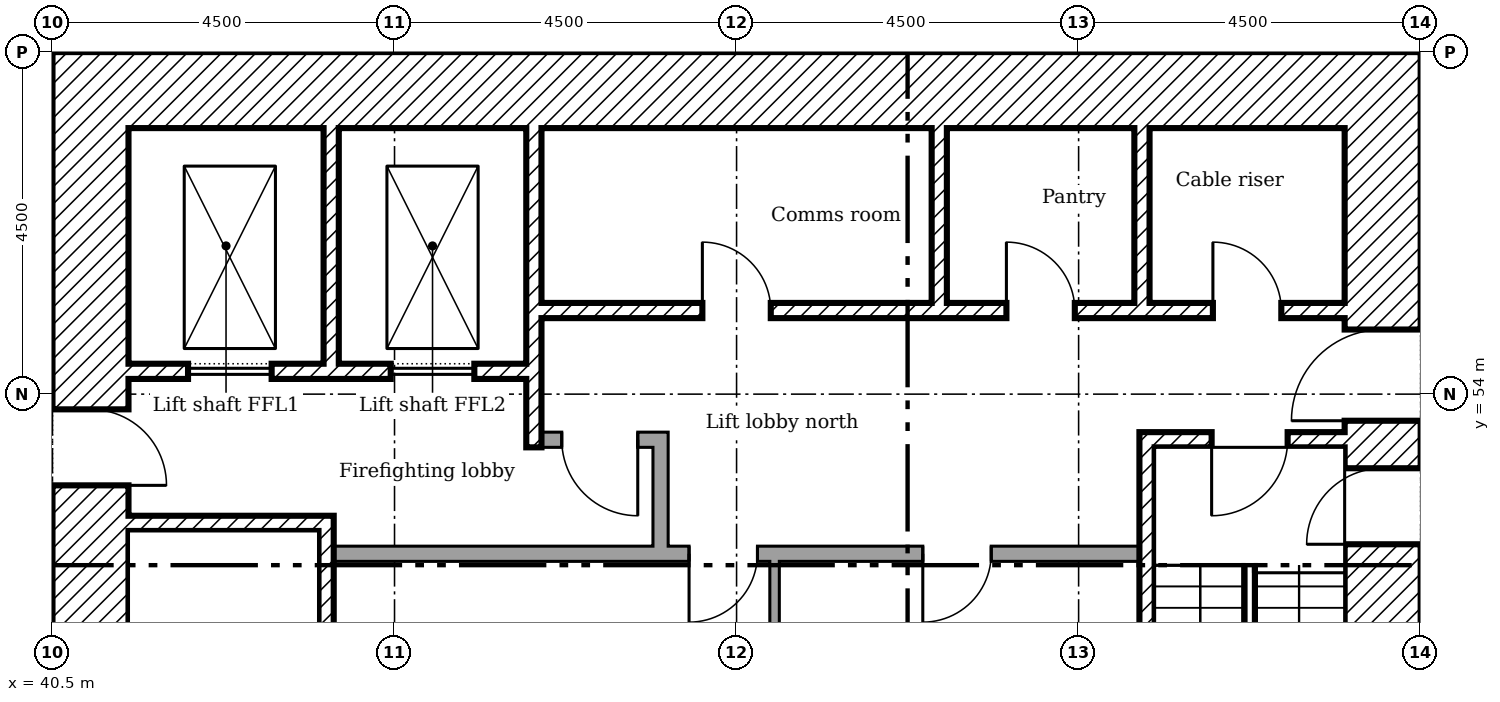
"""IFC4 building model, lengths in metres.
Left out: names, types, materials, properties, quantities, classifications, styles, units other than length and angle.
Written with IfcOpenShell. Run it as: python <this file> out.ifc"""

import sys

from ifc_helpers import new_model, si_unit, direction, frame, frame_2d, origin, place, context, subcontext, project, spatial, rectangle, extrude, element, fill, save


model = new_model("IFC4")
c1 = context("Model", 3, precision=1e-05, world=origin(), true_north=direction((0.0, 1.0)))
c2 = subcontext(c1, "Body", "Model", "MODEL_VIEW")
j1 = project(units=[si_unit("LENGTHUNIT", "METRE"), si_unit("PLANEANGLEUNIT", "RADIAN")], contexts=[c1])
p1 = place(None, origin())
s1 = spatial("IfcSite", under=j1, at=p1, CompositionType="ELEMENT")
p2 = place(p1, origin())
s2 = spatial("IfcBuilding", under=s1, at=p2, CompositionType="ELEMENT")
p3 = place(p2, frame((0.0, 0.0, 6.0)))
s3 = spatial("IfcBuildingStorey", under=s2, at=p3, CompositionType="ELEMENT", Elevation=6.0)
p4 = place(p3, frame((58.0, 40.5, 0.0), z_axis=(0.0, 0.0, 1.0), x_axis=(0.0, 1.0, 0.0)))
e1 = element("IfcWall", 1, at=p4, inside=s3, PredefinedType="SHEAR", context=c2, shape_type="SweptSolid", body=[
    extrude(rectangle(XDim=18.0, YDim=1.0, at=frame_2d((9.0, 0.0))), origin(), (0.0, 0.0, 1.0), 5.0),
])
p5 = place(p4, frame((13.15, 0.0, 0.0)))
e2 = element("IfcOpeningElement", 2, at=p5, cuts=e1, PredefinedType="OPENING", context=c2, shape_type="SweptSolid", body=[
    extrude(rectangle(XDim=1.2, YDim=2.1, at=frame_2d((0.6, 1.05))), frame((0.0, 0.51, 0.0), z_axis=(0.0, -1.0, 0.0), x_axis=(1.0, 0.0, 0.0)), (0.0, 0.0, 1.0), 1.02),
])
p6 = place(p4, frame((3.9, 0.0, 0.0)))
e3 = element("IfcOpeningElement", 3, at=p6, cuts=e1, PredefinedType="OPENING", context=c2, shape_type="SweptSolid", body=[
    extrude(rectangle(XDim=1.8, YDim=2.1, at=frame_2d((0.9, 1.05))), frame((0.0, 0.51, 0.0), z_axis=(0.0, -1.0, 0.0), x_axis=(1.0, 0.0, 0.0)), (0.0, 0.0, 1.0), 1.02),
])
p7 = place(p4, frame((11.525, 0.0, 0.0)))
e4 = element("IfcOpeningElement", 4, at=p7, cuts=e1, PredefinedType="OPENING", context=c2, shape_type="SweptSolid", body=[
    extrude(rectangle(XDim=1.0, YDim=2.1, at=frame_2d((0.5, 1.05))), frame((0.0, 0.51, 0.0), z_axis=(0.0, -1.0, 0.0), x_axis=(1.0, 0.0, 0.0)), (0.0, 0.0, 1.0), 1.02),
])
p8 = place(p3, frame((41.5, 58.0, 0.0)))
e5 = element("IfcWall", 5, at=p8, inside=s3, PredefinedType="SHEAR", context=c2, shape_type="SweptSolid", body=[
    extrude(rectangle(XDim=16.0, YDim=1.0, at=frame_2d((8.0, 0.0))), origin(), (0.0, 0.0, 1.0), 5.0),
])
p9 = place(p3, frame((41.0, 40.5, 0.0), z_axis=(0.0, 0.0, 1.0), x_axis=(0.0, 1.0, 0.0)))
e6 = element("IfcWall", 6, at=p9, inside=s3, PredefinedType="SHEAR", context=c2, shape_type="SweptSolid", body=[
    extrude(rectangle(XDim=18.0, YDim=1.0, at=frame_2d((9.0, 0.0))), origin(), (0.0, 0.0, 1.0), 5.0),
])
p10 = place(p9, frame((3.65, 0.0, 0.0)))
e7 = element("IfcOpeningElement", 7, at=p10, cuts=e6, PredefinedType="OPENING", context=c2, shape_type="SweptSolid", body=[
    extrude(rectangle(XDim=1.2, YDim=2.1, at=frame_2d((0.6, 1.05))), frame((0.0, 0.51, 0.0), z_axis=(0.0, -1.0, 0.0), x_axis=(1.0, 0.0, 0.0)), (0.0, 0.0, 1.0), 1.02),
])
p11 = place(p9, frame((5.475, 0.0, 0.0)))
e8 = element("IfcOpeningElement", 8, at=p11, cuts=e6, PredefinedType="OPENING", context=c2, shape_type="SweptSolid", body=[
    extrude(rectangle(XDim=1.0, YDim=2.1, at=frame_2d((0.5, 1.05))), frame((0.0, 0.51, 0.0), z_axis=(0.0, -1.0, 0.0), x_axis=(1.0, 0.0, 0.0)), (0.0, 0.0, 1.0), 1.02),
])
p12 = place(p9, frame((12.3, 0.0, 0.0)))
e9 = element("IfcOpeningElement", 9, at=p12, cuts=e6, PredefinedType="OPENING", context=c2, shape_type="SweptSolid", body=[
    extrude(rectangle(XDim=1.0, YDim=2.1, at=frame_2d((0.5, 1.05))), frame((0.0, 0.51, 0.0), z_axis=(0.0, -1.0, 0.0), x_axis=(1.0, 0.0, 0.0)), (0.0, 0.0, 1.0), 1.02),
])
p13 = place(p3, frame((44.167, 57.5, 0.0), z_axis=(0.0, 0.0, 1.0), x_axis=(0.0, -1.0, 0.0)))
e10 = element("IfcWall", 10, at=p13, inside=s3, PredefinedType="SHEAR", context=c2, shape_type="SweptSolid", body=[
    extrude(rectangle(XDim=3.1, YDim=0.2, at=frame_2d((1.55, 0.0))), origin(), (0.0, 0.0, 1.0), 5.0),
])
p14 = place(p3, frame((46.833, 57.5, 0.0), z_axis=(0.0, 0.0, 1.0), x_axis=(0.0, -1.0, 0.0)))
e11 = element("IfcWall", 11, at=p14, inside=s3, PredefinedType="SHEAR", context=c2, shape_type="SweptSolid", body=[
    extrude(rectangle(XDim=4.2, YDim=0.2, at=frame_2d((2.1, 0.0))), origin(), (0.0, 0.0, 1.0), 5.0),
])
for number, where, z_axis, x_axis in (
    (12, (52.167, 57.5, 0.0), (0.0, 0.0, 1.0), (0.0, -1.0, 0.0)),
    (13, (54.833, 57.5, 0.0), (0.0, 0.0, 1.0), (0.0, -1.0, 0.0)),
):
    element("IfcWall", number, at=place(p3, frame(where, z_axis=z_axis, x_axis=x_axis)), inside=s3, PredefinedType="SHEAR", context=c2, shape_type="SweptSolid", body=[
        extrude(rectangle(XDim=2.3, YDim=0.2, at=frame_2d((1.15, 0.0))), origin(), (0.0, 0.0, 1.0), 5.0),
    ])
p15 = place(p3, frame((48.5, 51.9, 0.0), z_axis=(0.0, 0.0, 1.0), x_axis=(0.0, 1.0, 0.0)))
e14 = element("IfcWall", 14, at=p15, inside=s3, PredefinedType="PARTITIONING", context=c2, shape_type="SweptSolid", body=[
    extrude(rectangle(XDim=1.6, YDim=0.2, at=frame_2d((0.8, 0.0))), origin(), (0.0, 0.0, 1.0), 5.0),
])
p16 = place(p3, frame((46.933, 53.4, 0.0)))
e15 = element("IfcWall", 15, at=p16, inside=s3, PredefinedType="PARTITIONING", context=c2, shape_type="SweptSolid", body=[
    extrude(rectangle(XDim=1.467, YDim=0.2, at=frame_2d((0.733, 0.0))), origin(), (0.0, 0.0, 1.0), 5.0),
])
p17 = place(p16, frame((0.267, 0.0, 0.0)))
e16 = element("IfcOpeningElement", 16, at=p17, cuts=e15, PredefinedType="OPENING", context=c2, shape_type="SweptSolid", body=[
    extrude(rectangle(XDim=1.0, YDim=2.1, at=frame_2d((0.5, 1.05))), frame((0.0, 0.11, 0.0), z_axis=(0.0, -1.0, 0.0), x_axis=(1.0, 0.0, 0.0)), (0.0, 0.0, 1.0), 0.22),
])
p18 = place(p3, frame((46.933, 55.1, 0.0)))
e17 = element("IfcWall", 17, at=p18, inside=s3, PredefinedType="SHEAR", context=c2, shape_type="SweptSolid", body=[
    extrude(rectangle(XDim=10.567, YDim=0.2, at=frame_2d((5.283, 0.0))), origin(), (0.0, 0.0, 1.0), 5.0),
])
p19 = place(p18, frame((8.833, 0.0, 0.0)))
e18 = element("IfcOpeningElement", 18, at=p19, cuts=e17, PredefinedType="OPENING", context=c2, shape_type="SweptSolid", body=[
    extrude(rectangle(XDim=0.9, YDim=2.1, at=frame_2d((0.45, 1.05))), frame((0.0, 0.11, 0.0), z_axis=(0.0, -1.0, 0.0), x_axis=(1.0, 0.0, 0.0)), (0.0, 0.0, 1.0), 0.22),
])
p20 = place(p18, frame((2.117, 0.0, 0.0)))
e19 = element("IfcOpeningElement", 19, at=p20, cuts=e17, PredefinedType="OPENING", context=c2, shape_type="SweptSolid", body=[
    extrude(rectangle(XDim=0.9, YDim=2.1, at=frame_2d((0.45, 1.05))), frame((0.0, 0.11, 0.0), z_axis=(0.0, -1.0, 0.0), x_axis=(1.0, 0.0, 0.0)), (0.0, 0.0, 1.0), 0.22),
])
p21 = place(p18, frame((6.117, 0.0, 0.0)))
e20 = element("IfcOpeningElement", 20, at=p21, cuts=e17, PredefinedType="OPENING", context=c2, shape_type="SweptSolid", body=[
    extrude(rectangle(XDim=0.9, YDim=2.1, at=frame_2d((0.45, 1.05))), frame((0.0, 0.11, 0.0), z_axis=(0.0, -1.0, 0.0), x_axis=(1.0, 0.0, 0.0)), (0.0, 0.0, 1.0), 0.22),
])
p22 = place(p3, frame((41.5, 54.3, 0.0)))
e21 = element("IfcWall", 21, at=p22, inside=s3, PredefinedType="SHEAR", context=c2, shape_type="SweptSolid", body=[
    extrude(rectangle(XDim=5.233, YDim=0.2, at=frame_2d((2.617, 0.0))), origin(), (0.0, 0.0, 1.0), 5.0),
])
p23 = place(p22, frame((0.783, 0.0, 0.0)))
e22 = element("IfcOpeningElement", 22, at=p23, cuts=e21, PredefinedType="OPENING", context=c2, shape_type="SweptSolid", body=[
    extrude(rectangle(XDim=1.1, YDim=2.1, at=frame_2d((0.55, 1.05))), frame((0.0, 0.11, 0.0), z_axis=(0.0, -1.0, 0.0), x_axis=(1.0, 0.0, 0.0)), (0.0, 0.0, 1.0), 0.22),
])
p24 = place(p22, frame((3.45, 0.0, 0.0)))
e23 = element("IfcOpeningElement", 23, at=p24, cuts=e21, PredefinedType="OPENING", context=c2, shape_type="SweptSolid", body=[
    extrude(rectangle(XDim=1.1, YDim=2.1, at=frame_2d((0.55, 1.05))), frame((0.0, 0.11, 0.0), z_axis=(0.0, -1.0, 0.0), x_axis=(1.0, 0.0, 0.0)), (0.0, 0.0, 1.0), 0.22),
])
p25 = place(p3, frame((44.1, 45.5, 0.0), z_axis=(0.0, 0.0, 1.0), x_axis=(0.0, 1.0, 0.0)))
e24 = element("IfcWall", 24, at=p25, inside=s3, PredefinedType="SHEAR", context=c2, shape_type="SweptSolid", body=[
    extrude(rectangle(XDim=6.9, YDim=0.2, at=frame_2d((3.45, 0.0))), origin(), (0.0, 0.0, 1.0), 5.0),
])
p26 = place(p3, frame((41.5, 52.3, 0.0)))
e25 = element("IfcWall", 25, at=p26, inside=s3, PredefinedType="SHEAR", context=c2, shape_type="SweptSolid", body=[
    extrude(rectangle(XDim=2.5, YDim=0.2, at=frame_2d((1.25, 0.0))), origin(), (0.0, 0.0, 1.0), 5.0),
])
p27 = place(p3, frame((54.8, 53.4, 0.0)))
e26 = element("IfcWall", 26, at=p27, inside=s3, PredefinedType="SHEAR", context=c2, shape_type="SweptSolid", body=[
    extrude(rectangle(XDim=2.7, YDim=0.2, at=frame_2d((1.35, 0.0))), origin(), (0.0, 0.0, 1.0), 5.0),
])
p28 = place(p27, frame((0.95, 0.0, 0.0)))
e27 = element("IfcOpeningElement", 27, at=p28, cuts=e26, PredefinedType="OPENING", context=c2, shape_type="SweptSolid", body=[
    extrude(rectangle(XDim=1.0, YDim=2.1, at=frame_2d((0.5, 1.05))), frame((0.0, 0.11, 0.0), z_axis=(0.0, -1.0, 0.0), x_axis=(1.0, 0.0, 0.0)), (0.0, 0.0, 1.0), 0.22),
])
p29 = place(p3, frame((54.9, 46.8, 0.0), z_axis=(0.0, 0.0, 1.0), x_axis=(0.0, 1.0, 0.0)))
e28 = element("IfcWall", 28, at=p29, inside=s3, PredefinedType="SHEAR", context=c2, shape_type="SweptSolid", body=[
    extrude(rectangle(XDim=6.5, YDim=0.2, at=frame_2d((3.25, 0.0))), origin(), (0.0, 0.0, 1.0), 5.0),
])
p30 = place(p3, frame((44.2, 51.9, 0.0)))
e29 = element("IfcWall", 29, at=p30, inside=s3, PredefinedType="PARTITIONING", context=c2, shape_type="SweptSolid", body=[
    extrude(rectangle(XDim=10.6, YDim=0.2, at=frame_2d((5.3, 0.0))), origin(), (0.0, 0.0, 1.0), 5.0),
])
p31 = place(p30, frame((4.675, 0.0, 0.0)))
e30 = element("IfcOpeningElement", 30, at=p31, cuts=e29, PredefinedType="OPENING", context=c2, shape_type="SweptSolid", body=[
    extrude(rectangle(XDim=0.9, YDim=2.1, at=frame_2d((0.45, 1.05))), frame((0.0, 0.11, 0.0), z_axis=(0.0, -1.0, 0.0), x_axis=(1.0, 0.0, 0.0)), (0.0, 0.0, 1.0), 0.22),
])
p32 = place(p30, frame((7.75, 0.0, 0.0)))
e31 = element("IfcOpeningElement", 31, at=p32, cuts=e29, PredefinedType="OPENING", context=c2, shape_type="SweptSolid", body=[
    extrude(rectangle(XDim=0.9, YDim=2.1, at=frame_2d((0.45, 1.05))), frame((0.0, 0.11, 0.0), z_axis=(0.0, -1.0, 0.0), x_axis=(1.0, 0.0, 0.0)), (0.0, 0.0, 1.0), 0.22),
])
p33 = place(p3, frame((50.0, 49.163, 0.0), z_axis=(0.0, 0.0, 1.0), x_axis=(0.0, 1.0, 0.0)))
e32 = element("IfcWall", 32, at=p33, inside=s3, PredefinedType="PARTITIONING", context=c2, shape_type="SweptSolid", body=[
    extrude(rectangle(XDim=2.637, YDim=0.125, at=frame_2d((1.319, 0.0))), origin(), (0.0, 0.0, 1.0), 5.0),
])
p34 = place(p5, origin())
e33 = element("IfcDoor", 33, at=p34, inside=s3, OperationType="SINGLE_SWING_RIGHT", PredefinedType="DOOR", context=c2, shape_type="SweptSolid", body=[
    extrude(rectangle(XDim=1.2, YDim=2.1, at=frame_2d((0.6, 1.05))), frame((0.0, 0.025, 0.0), z_axis=(0.0, -1.0, 0.0), x_axis=(1.0, 0.0, 0.0)), (0.0, 0.0, 1.0), 0.05),
])
fill(e2, e33)
p35 = place(p28, frame((1.0, 0.0, 0.0), x_axis=(-1.0, 0.0, 0.0)))
e34 = element("IfcDoor", 34, at=p35, inside=s3, OperationType="SINGLE_SWING_LEFT", PredefinedType="DOOR", context=c2, shape_type="SweptSolid", body=[
    extrude(rectangle(XDim=1.0, YDim=2.1, at=frame_2d((0.5, 1.05))), frame((0.0, 0.025, 0.0), z_axis=(0.0, -1.0, 0.0), x_axis=(1.0, 0.0, 0.0)), (0.0, 0.0, 1.0), 0.05),
])
fill(e27, e34)
p36 = place(p7, origin())
e35 = element("IfcDoor", 35, at=p36, inside=s3, OperationType="SINGLE_SWING_RIGHT", PredefinedType="DOOR", context=c2, shape_type="SweptSolid", body=[
    extrude(rectangle(XDim=1.0, YDim=2.1, at=frame_2d((0.5, 1.05))), frame((0.0, 0.025, 0.0), z_axis=(0.0, -1.0, 0.0), x_axis=(1.0, 0.0, 0.0)), (0.0, 0.0, 1.0), 0.05),
])
fill(e4, e35)
p37 = place(p17, frame((1.0, 0.0, 0.0), x_axis=(-1.0, 0.0, 0.0)))
e36 = element("IfcDoor", 36, at=p37, inside=s3, OperationType="SINGLE_SWING_RIGHT", PredefinedType="DOOR", context=c2, shape_type="SweptSolid", body=[
    extrude(rectangle(XDim=1.0, YDim=2.1, at=frame_2d((0.5, 1.05))), frame((0.0, 0.025, 0.0), z_axis=(0.0, -1.0, 0.0), x_axis=(1.0, 0.0, 0.0)), (0.0, 0.0, 1.0), 0.05),
])
fill(e16, e36)
p38 = place(p12, frame((1.0, 0.0, 0.0), x_axis=(-1.0, 0.0, 0.0)))
e37 = element("IfcDoor", 37, at=p38, inside=s3, OperationType="SINGLE_SWING_LEFT", PredefinedType="DOOR", context=c2, shape_type="SweptSolid", body=[
    extrude(rectangle(XDim=1.0, YDim=2.1, at=frame_2d((0.5, 1.05))), frame((0.0, 0.025, 0.0), z_axis=(0.0, -1.0, 0.0), x_axis=(1.0, 0.0, 0.0)), (0.0, 0.0, 1.0), 0.05),
])
fill(e9, e37)
p39 = place(p19, origin())
e38 = element("IfcDoor", 38, at=p39, inside=s3, OperationType="SINGLE_SWING_RIGHT", PredefinedType="DOOR", context=c2, shape_type="SweptSolid", body=[
    extrude(rectangle(XDim=0.9, YDim=2.1, at=frame_2d((0.45, 1.05))), frame((0.0, 0.025, 0.0), z_axis=(0.0, -1.0, 0.0), x_axis=(1.0, 0.0, 0.0)), (0.0, 0.0, 1.0), 0.05),
])
fill(e18, e38)
p40 = place(p20, origin())
e39 = element("IfcDoor", 39, at=p40, inside=s3, OperationType="SINGLE_SWING_RIGHT", PredefinedType="DOOR", context=c2, shape_type="SweptSolid", body=[
    extrude(rectangle(XDim=0.9, YDim=2.1, at=frame_2d((0.45, 1.05))), frame((0.0, 0.025, 0.0), z_axis=(0.0, -1.0, 0.0), x_axis=(1.0, 0.0, 0.0)), (0.0, 0.0, 1.0), 0.05),
])
fill(e19, e39)
p41 = place(p21, origin())
e40 = element("IfcDoor", 40, at=p41, inside=s3, OperationType="SINGLE_SWING_RIGHT", PredefinedType="DOOR", context=c2, shape_type="SweptSolid", body=[
    extrude(rectangle(XDim=0.9, YDim=2.1, at=frame_2d((0.45, 1.05))), frame((0.0, 0.025, 0.0), z_axis=(0.0, -1.0, 0.0), x_axis=(1.0, 0.0, 0.0)), (0.0, 0.0, 1.0), 0.05),
])
fill(e20, e40)
p42 = place(p31, frame((0.9, 0.0, 0.0), x_axis=(-1.0, 0.0, 0.0)))
e41 = element("IfcDoor", 41, at=p42, inside=s3, OperationType="SINGLE_SWING_LEFT", PredefinedType="DOOR", context=c2, shape_type="SweptSolid", body=[
    extrude(rectangle(XDim=0.9, YDim=2.1, at=frame_2d((0.45, 1.05))), frame((0.0, 0.025, 0.0), z_axis=(0.0, -1.0, 0.0), x_axis=(1.0, 0.0, 0.0)), (0.0, 0.0, 1.0), 0.05),
])
fill(e30, e41)
p43 = place(p32, frame((0.9, 0.0, 0.0), x_axis=(-1.0, 0.0, 0.0)))
e42 = element("IfcDoor", 42, at=p43, inside=s3, OperationType="SINGLE_SWING_LEFT", PredefinedType="DOOR", context=c2, shape_type="SweptSolid", body=[
    extrude(rectangle(XDim=0.9, YDim=2.1, at=frame_2d((0.45, 1.05))), frame((0.0, 0.025, 0.0), z_axis=(0.0, -1.0, 0.0), x_axis=(1.0, 0.0, 0.0)), (0.0, 0.0, 1.0), 0.05),
])
fill(e31, e42)
p44 = place(p23, origin())
e43 = element("IfcDoor", 43, at=p44, inside=s3, OperationType="SLIDING_TO_LEFT", PredefinedType="DOOR", context=c2, shape_type="SweptSolid", body=[
    extrude(rectangle(XDim=1.1, YDim=2.1, at=frame_2d((0.55, 1.05))), frame((0.0, 0.025, 0.0), z_axis=(0.0, -1.0, 0.0), x_axis=(1.0, 0.0, 0.0)), (0.0, 0.0, 1.0), 0.05),
])
fill(e22, e43)
p45 = place(p24, origin())
e44 = element("IfcDoor", 44, at=p45, inside=s3, OperationType="SLIDING_TO_LEFT", PredefinedType="DOOR", context=c2, shape_type="SweptSolid", body=[
    extrude(rectangle(XDim=1.1, YDim=2.1, at=frame_2d((0.55, 1.05))), frame((0.0, 0.025, 0.0), z_axis=(0.0, -1.0, 0.0), x_axis=(1.0, 0.0, 0.0)), (0.0, 0.0, 1.0), 0.05),
])
fill(e23, e44)
save(model, sys.argv[1])
